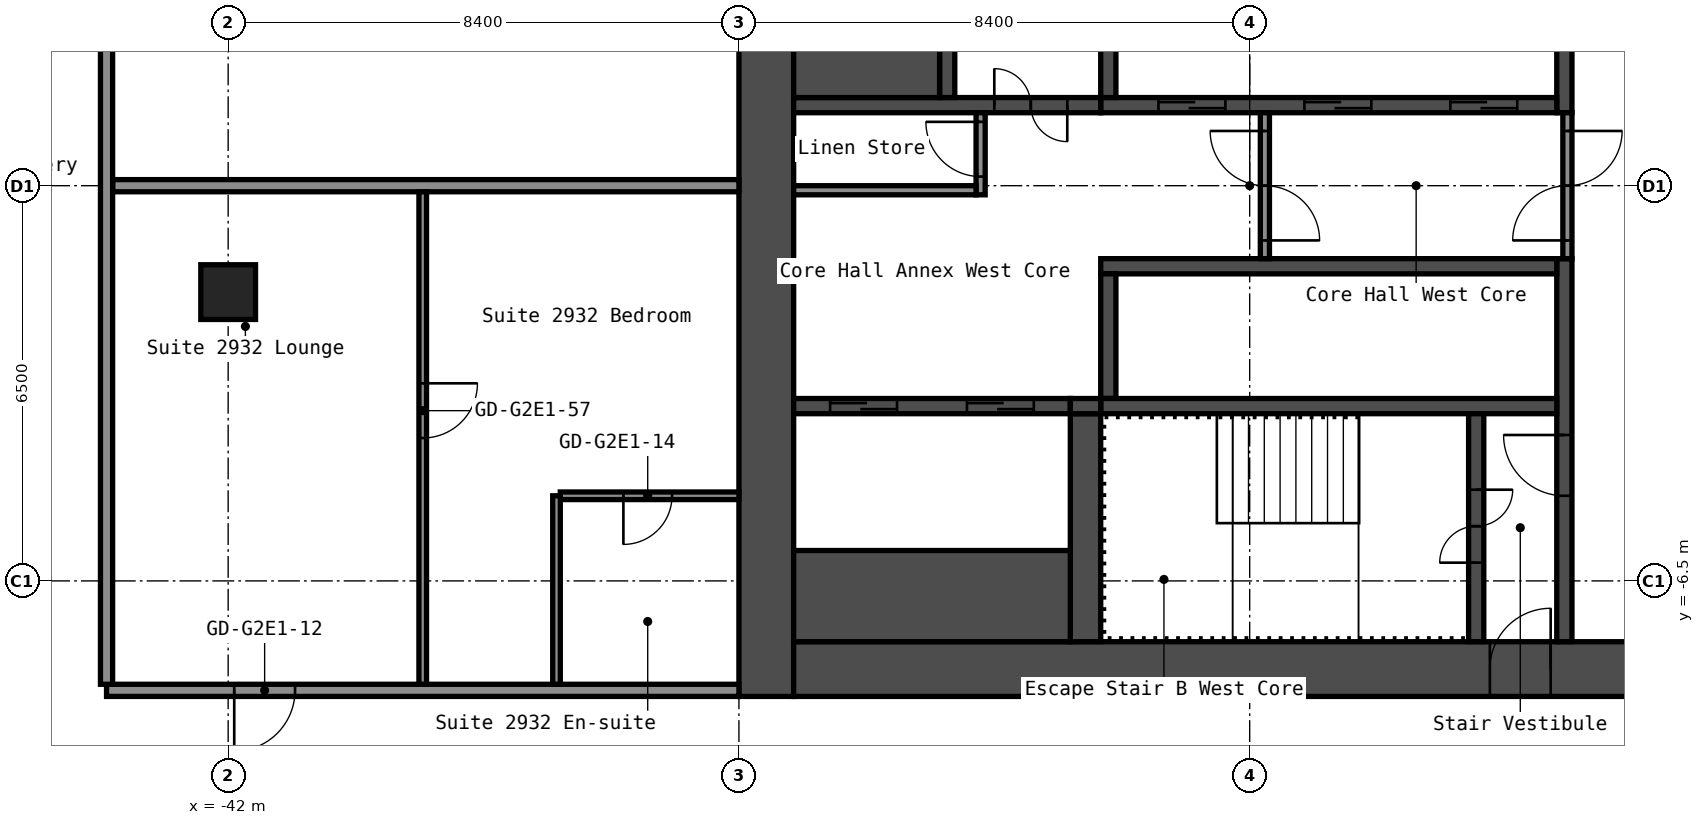
"""IFC4 building model, lengths in metres.
Left out: names, types, materials, properties, quantities, classifications, styles, units other than length and angle.
Written with IfcOpenShell. Run it as: python <this file> out.ifc"""

import sys

from ifc_helpers import new_model, si_unit, direction, frame, frame_2d, origin, origin_2d, place, context, subcontext, project, spatial, rectangle, hollow_rectangle, extrude, element, fill, save


model = new_model("IFC4")
c1 = context("Model", 3, precision=1e-05, world=origin(), true_north=direction((0.0, 1.0)))
c2 = subcontext(c1, "Body", "Model", "MODEL_VIEW")
j1 = project(units=[si_unit("LENGTHUNIT", "METRE"), si_unit("PLANEANGLEUNIT", "RADIAN")], contexts=[c1])
p1 = place(None, origin())
s1 = spatial("IfcSite", under=j1, at=p1, CompositionType="ELEMENT")
p2 = place(p1, origin())
s2 = spatial("IfcBuilding", under=s1, at=p2, CompositionType="ELEMENT")
p3 = place(p2, frame((0.0, 0.0, 104.2)))
s3 = spatial("IfcBuildingStorey", under=s2, at=p3, CompositionType="ELEMENT", Elevation=104.2)
p4 = place(p3, frame((-42.0, -1.75, 0.0), z_axis=(0.0, 0.0, 1.0), x_axis=(1.0, 0.0, 0.0)))
e1 = element("IfcColumn", 1, at=p4, inside=s3, PredefinedType="COLUMN", context=c2, shape_type="SweptSolid", body=[
    extrude(hollow_rectangle(XDim=0.9, YDim=0.9, WallThickness=0.036, at=origin_2d()), origin(), (0.0, 0.0, 1.0), 2.8),
])
p5 = place(p3, frame((-33.15, -8.4, 0.0), z_axis=(0.0, 0.0, 1.0), x_axis=(0.0, 1.0, 0.0)))
e2 = element("IfcWall", 2, at=p5, inside=s3, PredefinedType="SHEAR", context=c2, shape_type="SweptSolid", body=[
    extrude(rectangle(XDim=16.8, YDim=0.9, at=frame_2d((8.4, 0.0))), origin(), (0.0, 0.0, 1.0), 2.8),
])
p6 = place(p3, frame((-32.7, -7.95, 0.0), z_axis=(0.0, 0.0, 1.0), x_axis=(1.0, 0.0, 0.0)))
e3 = element("IfcWall", 3, at=p6, inside=s3, PredefinedType="SHEAR", context=c2, shape_type="SweptSolid", body=[
    extrude(rectangle(XDim=15.0, YDim=0.9, at=frame_2d((7.5, 0.0))), origin(), (0.0, 0.0, 1.0), 2.8),
])
p7 = place(p6, frame((11.45, 0.0, 0.0)))
e4 = element("IfcOpeningElement", 4, at=p7, cuts=e3, PredefinedType="OPENING", context=c2, shape_type="SweptSolid", body=[
    extrude(rectangle(XDim=1.0, YDim=2.1, at=frame_2d((0.5, 1.05))), frame((0.0, 0.46, 0.0), z_axis=(0.0, -1.0, 0.0), x_axis=(1.0, 0.0, 0.0)), (0.0, 0.0, 1.0), 0.92),
])
p8 = place(p3, frame((-20.025, 1.2, 0.0), z_axis=(0.0, 0.0, 1.0), x_axis=(0.0, 1.0, 0.0)))
e5 = element("IfcWall", 5, at=p8, inside=s3, PredefinedType="SHEAR", context=c2, shape_type="SweptSolid", body=[
    extrude(rectangle(XDim=6.3, YDim=0.25, at=frame_2d((3.15, 0.0))), origin(), (0.0, 0.0, 1.0), 2.8),
])
p9 = place(p3, frame((-20.025, -7.5, 0.0), z_axis=(0.0, 0.0, 1.0), x_axis=(0.0, 1.0, 0.0)))
e6 = element("IfcWall", 6, at=p9, inside=s3, PredefinedType="SHEAR", context=c2, shape_type="SweptSolid", body=[
    extrude(rectangle(XDim=6.3, YDim=0.25, at=frame_2d((3.15, 0.0))), origin(), (0.0, 0.0, 1.0), 2.8),
])
p10 = place(p9, frame((2.4, 0.0, 0.0)))
e7 = element("IfcOpeningElement", 7, at=p10, cuts=e6, PredefinedType="OPENING", context=c2, shape_type="SweptSolid", body=[
    extrude(rectangle(XDim=1.0, YDim=2.1, at=frame_2d((0.5, 1.05))), frame((0.0, 0.135, 0.0), z_axis=(0.0, -1.0, 0.0), x_axis=(1.0, 0.0, 0.0)), (0.0, 0.0, 1.0), 0.27),
])
p11 = place(p3, frame((-27.65, 1.325, 0.0), z_axis=(0.0, 0.0, 1.0), x_axis=(1.0, 0.0, 0.0)))
e8 = element("IfcWall", 8, at=p11, inside=s3, PredefinedType="SHEAR", context=c2, shape_type="SweptSolid", body=[
    extrude(rectangle(XDim=7.5, YDim=0.25, at=frame_2d((3.75, 0.0))), origin(), (0.0, 0.0, 1.0), 2.8),
])
p12 = place(p11, frame((5.75, 0.0, 0.0)))
e9 = element("IfcOpeningElement", 9, at=p12, cuts=e8, PredefinedType="OPENING", context=c2, shape_type="SweptSolid", body=[
    extrude(rectangle(XDim=1.1, YDim=2.1, at=frame_2d((0.55, 1.05))), frame((0.0, 0.135, 0.0), z_axis=(0.0, -1.0, 0.0), x_axis=(1.0, 0.0, 0.0)), (0.0, 0.0, 1.0), 0.27),
])
p13 = place(p11, frame((3.35, 0.0, 0.0)))
e10 = element("IfcOpeningElement", 10, at=p13, cuts=e8, PredefinedType="OPENING", context=c2, shape_type="SweptSolid", body=[
    extrude(rectangle(XDim=1.1, YDim=2.1, at=frame_2d((0.55, 1.05))), frame((0.0, 0.135, 0.0), z_axis=(0.0, -1.0, 0.0), x_axis=(1.0, 0.0, 0.0)), (0.0, 0.0, 1.0), 0.27),
])
p14 = place(p11, frame((0.95, 0.0, 0.0)))
e11 = element("IfcOpeningElement", 11, at=p14, cuts=e8, PredefinedType="OPENING", context=c2, shape_type="SweptSolid", body=[
    extrude(rectangle(XDim=1.1, YDim=2.1, at=frame_2d((0.55, 1.05))), frame((0.0, 0.135, 0.0), z_axis=(0.0, -1.0, 0.0), x_axis=(1.0, 0.0, 0.0)), (0.0, 0.0, 1.0), 0.27),
])
p15 = place(p3, frame((-27.525, 1.45, 0.0), z_axis=(0.0, 0.0, 1.0), x_axis=(0.0, 1.0, 0.0)))
e12 = element("IfcWall", 12, at=p15, inside=s3, PredefinedType="SHEAR", context=c2, shape_type="SweptSolid", body=[
    extrude(rectangle(XDim=2.05, YDim=0.25, at=frame_2d((1.025, 0.0))), origin(), (0.0, 0.0, 1.0), 2.8),
])
p16 = place(p3, frame((-32.7, 1.325, 0.0), z_axis=(0.0, 0.0, 1.0), x_axis=(1.0, 0.0, 0.0)))
e13 = element("IfcWall", 13, at=p16, inside=s3, PredefinedType="SHEAR", context=c2, shape_type="SweptSolid", body=[
    extrude(rectangle(XDim=5.05, YDim=0.25, at=frame_2d((2.525, 0.0))), origin(), (0.0, 0.0, 1.0), 2.8),
])
p17 = place(p16, frame((3.3, 0.0, 0.0)))
e14 = element("IfcOpeningElement", 14, at=p17, cuts=e13, PredefinedType="OPENING", context=c2, shape_type="SweptSolid", body=[
    extrude(rectangle(XDim=1.2, YDim=2.1, at=frame_2d((0.6, 1.05))), frame((0.0, 0.135, 0.0), z_axis=(0.0, -1.0, 0.0), x_axis=(1.0, 0.0, 0.0)), (0.0, 0.0, 1.0), 0.27),
])
p18 = place(p3, frame((-30.175, 1.45, 0.0), z_axis=(0.0, 0.0, 1.0), x_axis=(0.0, 1.0, 0.0)))
e15 = element("IfcWall", 15, at=p18, inside=s3, PredefinedType="SHEAR", context=c2, shape_type="SweptSolid", body=[
    extrude(rectangle(XDim=6.05, YDim=0.25, at=frame_2d((3.025, 0.0))), origin(), (0.0, 0.0, 1.0), 2.8),
])
p19 = place(p18, frame((2.625, 0.0, 0.0)))
e16 = element("IfcOpeningElement", 16, at=p19, cuts=e15, PredefinedType="OPENING", context=c2, shape_type="SweptSolid", body=[
    extrude(rectangle(XDim=1.1, YDim=2.1, at=frame_2d((0.55, 1.05))), frame((0.0, 0.135, 0.0), z_axis=(0.0, -1.0, 0.0), x_axis=(1.0, 0.0, 0.0)), (0.0, 0.0, 1.0), 0.27),
])
p20 = place(p3, frame((-32.7, 2.375, 0.0), z_axis=(0.0, 0.0, 1.0), x_axis=(1.0, 0.0, 0.0)))
e17 = element("IfcWall", 17, at=p20, inside=s3, PredefinedType="SHEAR", context=c2, shape_type="SweptSolid", body=[
    extrude(rectangle(XDim=2.4, YDim=1.85, at=frame_2d((1.2, 0.0))), origin(), (0.0, 0.0, 1.0), 2.8),
])
p21 = place(p3, frame((-27.65, -1.325, 0.0), z_axis=(0.0, 0.0, 1.0), x_axis=(1.0, 0.0, 0.0)))
e18 = element("IfcWall", 18, at=p21, inside=s3, PredefinedType="SHEAR", context=c2, shape_type="SweptSolid", body=[
    extrude(rectangle(XDim=7.5, YDim=0.25, at=frame_2d((3.75, 0.0))), origin(), (0.0, 0.0, 1.0), 2.8),
])
p22 = place(p3, frame((-27.525, -3.5, 0.0), z_axis=(0.0, 0.0, 1.0), x_axis=(0.0, 1.0, 0.0)))
e19 = element("IfcWall", 19, at=p22, inside=s3, PredefinedType="SHEAR", context=c2, shape_type="SweptSolid", body=[
    extrude(rectangle(XDim=2.05, YDim=0.25, at=frame_2d((1.025, 0.0))), origin(), (0.0, 0.0, 1.0), 2.8),
])
p23 = place(p3, frame((-27.65, -3.625, 0.0), z_axis=(0.0, 0.0, 1.0), x_axis=(1.0, 0.0, 0.0)))
e20 = element("IfcWall", 20, at=p23, inside=s3, PredefinedType="SHEAR", context=c2, shape_type="SweptSolid", body=[
    extrude(rectangle(XDim=7.5, YDim=0.25, at=frame_2d((3.75, 0.0))), origin(), (0.0, 0.0, 1.0), 2.8),
])
p24 = place(p3, frame((-21.475, -7.5, 0.0), z_axis=(0.0, 0.0, 1.0), x_axis=(0.0, 1.0, 0.0)))
e21 = element("IfcWall", 21, at=p24, inside=s3, PredefinedType="SHEAR", context=c2, shape_type="SweptSolid", body=[
    extrude(rectangle(XDim=3.75, YDim=0.25, at=frame_2d((1.875, 0.0))), origin(), (0.0, 0.0, 1.0), 2.8),
])
p25 = place(p24, frame((1.3, 0.0, 0.0)))
e22 = element("IfcOpeningElement", 22, at=p25, cuts=e21, PredefinedType="OPENING", context=c2, shape_type="SweptSolid", body=[
    extrude(rectangle(XDim=1.2, YDim=2.1, at=frame_2d((0.6, 1.05))), frame((0.0, 0.135, 0.0), z_axis=(0.0, -1.0, 0.0), x_axis=(1.0, 0.0, 0.0)), (0.0, 0.0, 1.0), 0.27),
])
p26 = place(p3, frame((-27.9, -7.5, 0.0), z_axis=(0.0, 0.0, 1.0), x_axis=(0.0, 1.0, 0.0)))
e23 = element("IfcWall", 23, at=p26, inside=s3, PredefinedType="SHEAR", context=c2, shape_type="SweptSolid", body=[
    extrude(rectangle(XDim=3.75, YDim=0.5, at=frame_2d((1.875, 0.0))), origin(), (0.0, 0.0, 1.0), 2.8),
])
p27 = place(p3, frame((-32.7, -3.625, 0.0), z_axis=(0.0, 0.0, 1.0), x_axis=(1.0, 0.0, 0.0)))
e24 = element("IfcWall", 24, at=p27, inside=s3, PredefinedType="SHEAR", context=c2, shape_type="SweptSolid", body=[
    extrude(rectangle(XDim=4.55, YDim=0.25, at=frame_2d((2.275, 0.0))), origin(), (0.0, 0.0, 1.0), 2.8),
])
p28 = place(p27, frame((2.85, 0.0, 0.0)))
e25 = element("IfcOpeningElement", 25, at=p28, cuts=e24, PredefinedType="OPENING", context=c2, shape_type="SweptSolid", body=[
    extrude(rectangle(XDim=1.1, YDim=2.1, at=frame_2d((0.55, 1.05))), frame((0.0, 0.135, 0.0), z_axis=(0.0, -1.0, 0.0), x_axis=(1.0, 0.0, 0.0)), (0.0, 0.0, 1.0), 0.27),
])
p29 = place(p27, frame((0.6, 0.0, 0.0)))
e26 = element("IfcOpeningElement", 26, at=p29, cuts=e24, PredefinedType="OPENING", context=c2, shape_type="SweptSolid", body=[
    extrude(rectangle(XDim=1.1, YDim=2.1, at=frame_2d((0.55, 1.05))), frame((0.0, 0.135, 0.0), z_axis=(0.0, -1.0, 0.0), x_axis=(1.0, 0.0, 0.0)), (0.0, 0.0, 1.0), 0.27),
])
p30 = place(p3, frame((-32.7, -6.75, 0.0), z_axis=(0.0, 0.0, 1.0), x_axis=(1.0, 0.0, 0.0)))
e27 = element("IfcWall", 27, at=p30, inside=s3, PredefinedType="SHEAR", context=c2, shape_type="SweptSolid", body=[
    extrude(rectangle(XDim=4.55, YDim=1.5, at=frame_2d((2.275, 0.0))), origin(), (0.0, 0.0, 1.0), 2.8),
])
p31 = place(p3, frame((-28.15, -3.625, 0.0), z_axis=(0.0, 0.0, 1.0), x_axis=(1.0, 0.0, 0.0)))
e28 = element("IfcWall", 28, at=p31, inside=s3, PredefinedType="SHEAR", context=c2, shape_type="SweptSolid", body=[
    extrude(rectangle(XDim=0.5, YDim=0.25, at=frame_2d((0.25, 0.0))), origin(), (0.0, 0.0, 1.0), 2.8),
])
p32 = place(p3, frame((-19.975, -1.2, 0.0), z_axis=(0.0, 0.0, 1.0), x_axis=(0.0, 1.0, 0.0)))
e29 = element("IfcWall", 29, at=p32, inside=s3, PredefinedType="PARTITIONING", context=c2, shape_type="SweptSolid", body=[
    extrude(rectangle(XDim=2.4, YDim=0.15, at=frame_2d((1.2, 0.0))), origin(), (0.0, 0.0, 1.0), 2.8),
])
p33 = place(p32, frame((0.3, 0.0, 0.0)))
e30 = element("IfcOpeningElement", 30, at=p33, cuts=e29, PredefinedType="OPENING", context=c2, shape_type="SweptSolid", body=[
    extrude(rectangle(XDim=1.8, YDim=2.1, at=frame_2d((0.9, 1.05))), frame((0.0, 0.085, 0.0), z_axis=(0.0, -1.0, 0.0), x_axis=(1.0, 0.0, 0.0)), (0.0, 0.0, 1.0), 0.17),
])
p34 = place(p3, frame((-24.95, -1.2, 0.0), z_axis=(0.0, 0.0, 1.0), x_axis=(0.0, 1.0, 0.0)))
e31 = element("IfcWall", 31, at=p34, inside=s3, PredefinedType="PARTITIONING", context=c2, shape_type="SweptSolid", body=[
    extrude(rectangle(XDim=2.4, YDim=0.15, at=frame_2d((1.2, 0.0))), origin(), (0.0, 0.0, 1.0), 2.8),
])
p35 = place(p34, frame((0.3, 0.0, 0.0)))
e32 = element("IfcOpeningElement", 32, at=p35, cuts=e31, PredefinedType="OPENING", context=c2, shape_type="SweptSolid", body=[
    extrude(rectangle(XDim=1.8, YDim=2.1, at=frame_2d((0.9, 1.05))), frame((0.0, 0.085, 0.0), z_axis=(0.0, -1.0, 0.0), x_axis=(1.0, 0.0, 0.0)), (0.0, 0.0, 1.0), 0.17),
])
p36 = place(p3, frame((-29.625, -0.15, 0.0), z_axis=(0.0, 0.0, 1.0), x_axis=(0.0, 1.0, 0.0)))
e33 = element("IfcWall", 33, at=p36, inside=s3, PredefinedType="PARTITIONING", context=c2, shape_type="SweptSolid", body=[
    extrude(rectangle(XDim=1.35, YDim=0.15, at=frame_2d((0.675, 0.0))), origin(), (0.0, 0.0, 1.0), 2.8),
])
p37 = place(p36, frame((0.3, 0.0, 0.0)))
e34 = element("IfcOpeningElement", 34, at=p37, cuts=e33, PredefinedType="OPENING", context=c2, shape_type="SweptSolid", body=[
    extrude(rectangle(XDim=0.9, YDim=2.1, at=frame_2d((0.45, 1.05))), frame((0.0, 0.085, 0.0), z_axis=(0.0, -1.0, 0.0), x_axis=(1.0, 0.0, 0.0)), (0.0, 0.0, 1.0), 0.17),
])
p38 = place(p3, frame((-32.7, -0.075, 0.0), z_axis=(0.0, 0.0, 1.0), x_axis=(1.0, 0.0, 0.0)))
e35 = element("IfcWall", 35, at=p38, inside=s3, PredefinedType="PARTITIONING", context=c2, shape_type="SweptSolid", body=[
    extrude(rectangle(XDim=3.0, YDim=0.15, at=frame_2d((1.5, 0.0))), origin(), (0.0, 0.0, 1.0), 2.8),
])
p39 = place(p3, frame((-44.0, -8.3, 0.0), z_axis=(0.0, 0.0, 1.0), x_axis=(1.0, 0.0, 0.0)))
e36 = element("IfcWall", 36, at=p39, inside=s3, PredefinedType="PARTITIONING", context=c2, shape_type="SweptSolid", body=[
    extrude(rectangle(XDim=10.4, YDim=0.2, at=frame_2d((5.2, 0.0))), origin(), (0.0, 0.0, 1.0), 2.8),
])
p40 = place(p39, frame((2.1, 0.0, 0.0)))
e37 = element("IfcOpeningElement", 37, at=p40, cuts=e36, PredefinedType="OPENING", context=c2, shape_type="SweptSolid", body=[
    extrude(rectangle(XDim=1.0, YDim=2.1, at=frame_2d((0.5, 1.05))), frame((0.0, 0.11, 0.0), z_axis=(0.0, -1.0, 0.0), x_axis=(1.0, 0.0, 0.0)), (0.0, 0.0, 1.0), 0.22),
])
p41 = place(p3, frame((-36.538, -5.1, 0.0), z_axis=(0.0, 0.0, 1.0), x_axis=(1.0, 0.0, 0.0)))
e38 = element("IfcWall", 38, at=p41, inside=s3, PredefinedType="PARTITIONING", context=c2, shape_type="SweptSolid", body=[
    extrude(rectangle(XDim=2.938, YDim=0.125, at=frame_2d((1.469, 0.0))), origin(), (0.0, 0.0, 1.0), 2.8),
])
p42 = place(p41, frame((1.038, 0.0, 0.0)))
e39 = element("IfcOpeningElement", 39, at=p42, cuts=e38, PredefinedType="OPENING", context=c2, shape_type="SweptSolid", body=[
    extrude(rectangle(XDim=0.8, YDim=2.1, at=frame_2d((0.4, 1.05))), frame((0.0, 0.073, 0.0), z_axis=(0.0, -1.0, 0.0), x_axis=(1.0, 0.0, 0.0)), (0.0, 0.0, 1.0), 0.145),
])
p43 = place(p3, frame((-43.9, 0.0, 0.0), z_axis=(0.0, 0.0, 1.0), x_axis=(1.0, 0.0, 0.0)))
e40 = element("IfcWall", 40, at=p43, inside=s3, PredefinedType="PARTITIONING", context=c2, shape_type="SweptSolid", body=[
    extrude(rectangle(XDim=10.3, YDim=0.2, at=frame_2d((5.15, 0.0))), origin(), (0.0, 0.0, 1.0), 2.8),
])
p44 = place(p3, frame((-44.0, -8.2, 0.0), z_axis=(0.0, 0.0, 1.0), x_axis=(0.0, 1.0, 0.0)))
e41 = element("IfcWall", 41, at=p44, inside=s3, PredefinedType="PARTITIONING", context=c2, shape_type="SweptSolid", body=[
    extrude(rectangle(XDim=16.4, YDim=0.2, at=frame_2d((8.2, 0.0))), origin(), (0.0, 0.0, 1.0), 2.8),
])
p45 = place(p3, frame((-38.8, -8.2, 0.0), z_axis=(0.0, 0.0, 1.0), x_axis=(0.0, 1.0, 0.0)))
e42 = element("IfcWall", 42, at=p45, inside=s3, PredefinedType="PARTITIONING", context=c2, shape_type="SweptSolid", body=[
    extrude(rectangle(XDim=8.1, YDim=0.125, at=frame_2d((4.05, 0.0))), origin(), (0.0, 0.0, 1.0), 2.8),
])
p46 = place(p45, frame((4.05, 0.0, 0.0)))
e43 = element("IfcOpeningElement", 43, at=p46, cuts=e42, PredefinedType="OPENING", context=c2, shape_type="SweptSolid", body=[
    extrude(rectangle(XDim=0.9, YDim=2.1, at=frame_2d((0.45, 1.05))), frame((0.0, 0.073, 0.0), z_axis=(0.0, -1.0, 0.0), x_axis=(1.0, 0.0, 0.0)), (0.0, 0.0, 1.0), 0.145),
])
p47 = place(p3, frame((-36.6, -8.2, 0.0), z_axis=(0.0, 0.0, 1.0), x_axis=(0.0, 1.0, 0.0)))
e44 = element("IfcWall", 44, at=p47, inside=s3, PredefinedType="PARTITIONING", context=c2, shape_type="SweptSolid", body=[
    extrude(rectangle(XDim=3.1, YDim=0.125, at=frame_2d((1.55, 0.0))), origin(), (0.0, 0.0, 1.0), 2.8),
])
p48 = place(p7, origin())
e45 = element("IfcDoor", 45, at=p48, inside=s3, OperationType="SINGLE_SWING_LEFT", PredefinedType="DOOR", context=c2, shape_type="SweptSolid", body=[
    extrude(rectangle(XDim=1.0, YDim=2.1, at=frame_2d((0.5, 1.05))), frame((0.0, 0.025, 0.0), z_axis=(0.0, -1.0, 0.0), x_axis=(1.0, 0.0, 0.0)), (0.0, 0.0, 1.0), 0.05),
])
fill(e4, e45)
p49 = place(p25, origin())
e46 = element("IfcDoor", 46, at=p49, inside=s3, OperationType="DOUBLE_DOOR_SINGLE_SWING", PredefinedType="DOOR", context=c2, shape_type="SweptSolid", body=[
    extrude(rectangle(XDim=1.2, YDim=2.1, at=frame_2d((0.6, 1.05))), frame((0.0, 0.025, 0.0), z_axis=(0.0, -1.0, 0.0), x_axis=(1.0, 0.0, 0.0)), (0.0, 0.0, 1.0), 0.05),
])
fill(e22, e46)
p50 = place(p10, origin())
e47 = element("IfcDoor", 47, at=p50, inside=s3, OperationType="SINGLE_SWING_LEFT", PredefinedType="DOOR", context=c2, shape_type="SweptSolid", body=[
    extrude(rectangle(XDim=1.0, YDim=2.1, at=frame_2d((0.5, 1.05))), frame((0.0, 0.025, 0.0), z_axis=(0.0, -1.0, 0.0), x_axis=(1.0, 0.0, 0.0)), (0.0, 0.0, 1.0), 0.05),
])
fill(e7, e47)
p51 = place(p17, origin())
e48 = element("IfcDoor", 48, at=p51, inside=s3, OperationType="DOUBLE_DOOR_SINGLE_SWING", PredefinedType="DOOR", context=c2, shape_type="SweptSolid", body=[
    extrude(rectangle(XDim=1.2, YDim=2.1, at=frame_2d((0.6, 1.05))), frame((0.0, 0.025, 0.0), z_axis=(0.0, -1.0, 0.0), x_axis=(1.0, 0.0, 0.0)), (0.0, 0.0, 1.0), 0.05),
])
fill(e14, e48)
p52 = place(p33, origin())
e49 = element("IfcDoor", 49, at=p52, inside=s3, OperationType="DOUBLE_DOOR_SINGLE_SWING", PredefinedType="DOOR", context=c2, shape_type="SweptSolid", body=[
    extrude(rectangle(XDim=1.8, YDim=2.1, at=frame_2d((0.9, 1.05))), frame((0.0, 0.025, 0.0), z_axis=(0.0, -1.0, 0.0), x_axis=(1.0, 0.0, 0.0)), (0.0, 0.0, 1.0), 0.05),
])
fill(e30, e49)
p53 = place(p35, origin())
e50 = element("IfcDoor", 50, at=p53, inside=s3, OperationType="DOUBLE_DOOR_SINGLE_SWING", PredefinedType="DOOR", context=c2, shape_type="SweptSolid", body=[
    extrude(rectangle(XDim=1.8, YDim=2.1, at=frame_2d((0.9, 1.05))), frame((0.0, 0.025, 0.0), z_axis=(0.0, -1.0, 0.0), x_axis=(1.0, 0.0, 0.0)), (0.0, 0.0, 1.0), 0.05),
])
fill(e32, e50)
p54 = place(p37, origin())
e51 = element("IfcDoor", 51, at=p54, inside=s3, OperationType="SINGLE_SWING_LEFT", PredefinedType="DOOR", context=c2, shape_type="SweptSolid", body=[
    extrude(rectangle(XDim=0.9, YDim=2.1, at=frame_2d((0.45, 1.05))), frame((0.0, 0.025, 0.0), z_axis=(0.0, -1.0, 0.0), x_axis=(1.0, 0.0, 0.0)), (0.0, 0.0, 1.0), 0.05),
])
fill(e34, e51)
p55 = place(p12, origin())
e52 = element("IfcDoor", 52, at=p55, inside=s3, OperationType="DOUBLE_DOOR_SLIDING", PredefinedType="DOOR", context=c2, shape_type="SweptSolid", body=[
    extrude(rectangle(XDim=1.1, YDim=2.1, at=frame_2d((0.55, 1.05))), frame((0.0, 0.025, 0.0), z_axis=(0.0, -1.0, 0.0), x_axis=(1.0, 0.0, 0.0)), (0.0, 0.0, 1.0), 0.05),
])
fill(e9, e52)
p56 = place(p13, origin())
e53 = element("IfcDoor", 53, at=p56, inside=s3, OperationType="DOUBLE_DOOR_SLIDING", PredefinedType="DOOR", context=c2, shape_type="SweptSolid", body=[
    extrude(rectangle(XDim=1.1, YDim=2.1, at=frame_2d((0.55, 1.05))), frame((0.0, 0.025, 0.0), z_axis=(0.0, -1.0, 0.0), x_axis=(1.0, 0.0, 0.0)), (0.0, 0.0, 1.0), 0.05),
])
fill(e10, e53)
p57 = place(p14, origin())
e54 = element("IfcDoor", 54, at=p57, inside=s3, OperationType="DOUBLE_DOOR_SLIDING", PredefinedType="DOOR", context=c2, shape_type="SweptSolid", body=[
    extrude(rectangle(XDim=1.1, YDim=2.1, at=frame_2d((0.55, 1.05))), frame((0.0, 0.025, 0.0), z_axis=(0.0, -1.0, 0.0), x_axis=(1.0, 0.0, 0.0)), (0.0, 0.0, 1.0), 0.05),
])
fill(e11, e54)
p58 = place(p28, origin())
e55 = element("IfcDoor", 55, at=p58, inside=s3, OperationType="DOUBLE_DOOR_SLIDING", PredefinedType="DOOR", context=c2, shape_type="SweptSolid", body=[
    extrude(rectangle(XDim=1.1, YDim=2.1, at=frame_2d((0.55, 1.05))), frame((0.0, 0.025, 0.0), z_axis=(0.0, -1.0, 0.0), x_axis=(1.0, 0.0, 0.0)), (0.0, 0.0, 1.0), 0.05),
])
fill(e25, e55)
p59 = place(p29, origin())
e56 = element("IfcDoor", 56, at=p59, inside=s3, OperationType="DOUBLE_DOOR_SLIDING", PredefinedType="DOOR", context=c2, shape_type="SweptSolid", body=[
    extrude(rectangle(XDim=1.1, YDim=2.1, at=frame_2d((0.55, 1.05))), frame((0.0, 0.025, 0.0), z_axis=(0.0, -1.0, 0.0), x_axis=(1.0, 0.0, 0.0)), (0.0, 0.0, 1.0), 0.05),
])
fill(e26, e56)
p60 = place(p40, origin())
e57 = element("IfcDoor", 57, at=p60, inside=s3, OperationType="SINGLE_SWING_LEFT", PredefinedType="DOOR", context=c2, shape_type="SweptSolid", body=[
    extrude(rectangle(XDim=1.0, YDim=2.1, at=frame_2d((0.5, 1.05))), frame((0.0, 0.025, 0.0), z_axis=(0.0, -1.0, 0.0), x_axis=(1.0, 0.0, 0.0)), (0.0, 0.0, 1.0), 0.05),
])
fill(e37, e57)
p61 = place(p42, origin())
e58 = element("IfcDoor", 58, at=p61, inside=s3, OperationType="SINGLE_SWING_LEFT", PredefinedType="DOOR", context=c2, shape_type="SweptSolid", body=[
    extrude(rectangle(XDim=0.8, YDim=2.1, at=frame_2d((0.4, 1.05))), frame((0.0, 0.025, 0.0), z_axis=(0.0, -1.0, 0.0), x_axis=(1.0, 0.0, 0.0)), (0.0, 0.0, 1.0), 0.05),
])
fill(e39, e58)
p62 = place(p46, origin())
e59 = element("IfcDoor", 59, at=p62, inside=s3, OperationType="SINGLE_SWING_RIGHT", PredefinedType="DOOR", context=c2, shape_type="SweptSolid", body=[
    extrude(rectangle(XDim=0.9, YDim=2.1, at=frame_2d((0.45, 1.05))), frame((0.0, 0.025, 0.0), z_axis=(0.0, -1.0, 0.0), x_axis=(1.0, 0.0, 0.0)), (0.0, 0.0, 1.0), 0.05),
])
fill(e43, e59)
save(model, sys.argv[1])
